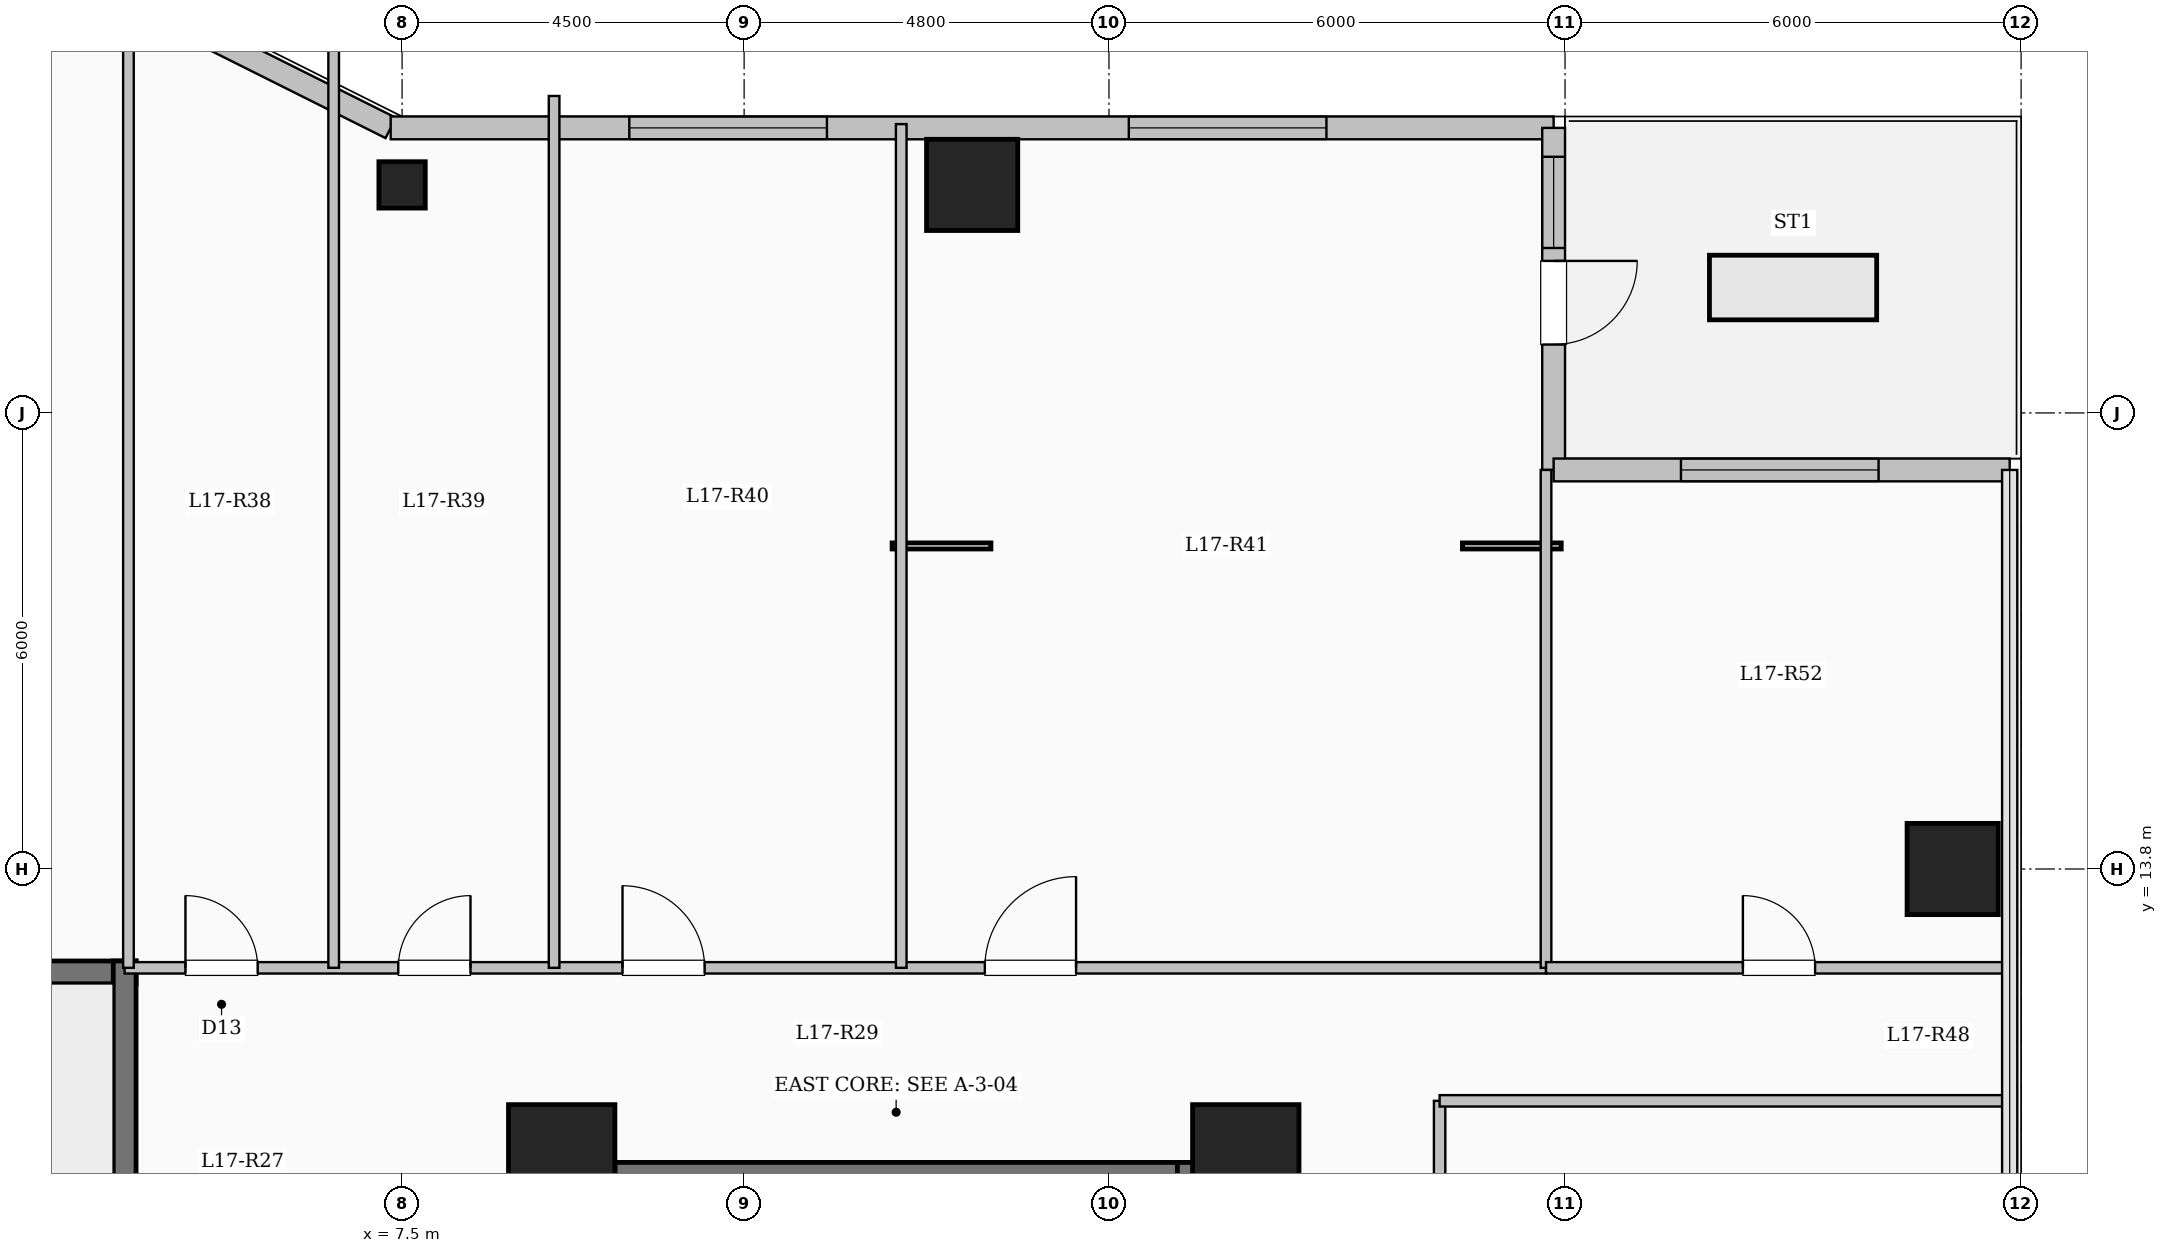
"""IFC4 building model, lengths in metres.
Left out: names, types, materials, properties, quantities, classifications, styles, units other than length and angle.
Written with IfcOpenShell. Run it as: python <this file> out.ifc"""

import sys

from ifc_helpers import new_model, si_unit, direction, frame, frame_2d, origin, origin_2d, place, context, subcontext, project, spatial, rectangle, hollow_circle, extrude, element, fill, save


model = new_model("IFC4")
c1 = context("Model", 3, precision=1e-05, world=origin(), true_north=direction((0.0, 1.0)))
c2 = subcontext(c1, "Body", "Model", "MODEL_VIEW")
j1 = project(units=[si_unit("LENGTHUNIT", "METRE"), si_unit("PLANEANGLEUNIT", "RADIAN")], contexts=[c1])
p1 = place(None, origin())
s1 = spatial("IfcSite", under=j1, at=p1, CompositionType="ELEMENT")
p2 = place(p1, origin())
s2 = spatial("IfcBuilding", under=s1, at=p2, CompositionType="ELEMENT")
p3 = place(p2, frame((0.0, 0.0, 64.2)))
s3 = spatial("IfcBuildingStorey", under=s2, at=p3, CompositionType="ELEMENT", Elevation=64.2)
for number, where, z_axis, x_axis in (
    (1, (9.6, 10.0, 0.0), (0.0, 0.0, 1.0), (1.0, 0.0, 0.0)),
    (2, (18.6, 10.0, 0.0), (0.0, 0.0, 1.0), (1.0, 0.0, 0.0)),
):
    element("IfcColumn", number, at=place(p3, frame(where, z_axis=z_axis, x_axis=x_axis)), inside=s3, PredefinedType="COLUMN", context=c2, shape_type="SweptSolid", body=[
        extrude(rectangle(XDim=1.4, YDim=1.4, at=origin_2d()), origin(), (0.0, 0.0, 1.0), 4.5),
    ])
p4 = place(p3, frame((7.5, 22.8, 0.0), z_axis=(0.0, 0.0, 1.0), x_axis=(1.0, 0.0, 0.0)))
e3 = element("IfcColumn", 3, at=p4, inside=s3, PredefinedType="COLUMN", context=c2, shape_type="SweptSolid", body=[
    extrude(hollow_circle(Radius=0.305, WallThickness=0.025, at=origin_2d()), origin(), (0.0, 0.0, 1.0), 4.5),
])
for number, where, z_axis, x_axis in (
    (4, (15.0, 22.8, 0.0), (0.0, 0.0, 1.0), (1.0, 0.0, 0.0)),
    (5, (27.9, 13.8, 0.0), (0.0, 0.0, 1.0), (1.0, 0.0, 0.0)),
):
    element("IfcColumn", number, at=place(p3, frame(where, z_axis=z_axis, x_axis=x_axis)), inside=s3, PredefinedType="COLUMN", context=c2, shape_type="SweptSolid", body=[
        extrude(rectangle(XDim=1.2, YDim=1.2, at=origin_2d()), origin(), (0.0, 0.0, 1.0), 4.5),
    ])
p5 = place(p3, frame((4.35, 25.05, 0.0), z_axis=(0.0, 0.0, 1.0), x_axis=(0.894427191, -0.4472135955, 0.0)))
e6 = element("IfcWall", 6, at=p5, inside=s3, PredefinedType="SOLIDWALL", context=c2, shape_type="SweptSolid", body=[
    extrude(rectangle(XDim=3.354, YDim=0.3, at=frame_2d((1.677, 0.0))), origin(), (0.0, 0.0, 1.0), 4.2),
])
p6 = place(p3, frame((7.35, 23.55, 0.0), z_axis=(0.0, 0.0, 1.0), x_axis=(1.0, 0.0, 0.0)))
e7 = element("IfcWall", 7, at=p6, inside=s3, PredefinedType="SOLIDWALL", context=c2, shape_type="SweptSolid", body=[
    extrude(rectangle(XDim=15.3, YDim=0.3, at=frame_2d((7.65, 0.0))), origin(), (0.0, 0.0, 1.0), 4.2),
])
p7 = place(p6, frame((3.139, 0.0, 0.85)))
e8 = element("IfcOpeningElement", 8, at=p7, cuts=e7, PredefinedType="OPENING", context=c2, shape_type="SweptSolid", body=[
    extrude(rectangle(XDim=2.6, YDim=2.4, at=frame_2d((1.3, 1.2))), frame((0.0, 0.16, 0.0), z_axis=(0.0, -1.0, 0.0), x_axis=(1.0, 0.0, 0.0)), (0.0, 0.0, 1.0), 0.32),
])
p8 = place(p6, frame((9.711, 0.0, 0.85)))
e9 = element("IfcOpeningElement", 9, at=p8, cuts=e7, PredefinedType="OPENING", context=c2, shape_type="SweptSolid", body=[
    extrude(rectangle(XDim=2.6, YDim=2.4, at=frame_2d((1.3, 1.2))), frame((0.0, 0.16, 0.0), z_axis=(0.0, -1.0, 0.0), x_axis=(1.0, 0.0, 0.0)), (0.0, 0.0, 1.0), 0.32),
])
p9 = place(p3, frame((22.65, 23.55, 0.0), z_axis=(0.0, 0.0, 1.0), x_axis=(0.0, -1.0, 0.0)))
e10 = element("IfcWall", 10, at=p9, inside=s3, PredefinedType="SOLIDWALL", context=c2, shape_type="SweptSolid", body=[
    extrude(rectangle(XDim=4.5, YDim=0.3, at=frame_2d((2.25, 0.0))), origin(), (0.0, 0.0, 1.0), 4.2),
])
p10 = place(p9, frame((1.75, 0.0, 0.0)))
e11 = element("IfcOpeningElement", 11, at=p10, cuts=e10, PredefinedType="OPENING", context=c2, shape_type="SweptSolid", body=[
    extrude(rectangle(XDim=1.1, YDim=2.2, at=frame_2d((0.55, 1.1))), frame((0.0, 0.16, 0.0), z_axis=(0.0, -1.0, 0.0), x_axis=(1.0, 0.0, 0.0)), (0.0, 0.0, 1.0), 0.32),
])
p11 = place(p9, frame((0.38, 0.0, 0.95)))
e12 = element("IfcOpeningElement", 12, at=p11, cuts=e10, PredefinedType="OPENING", context=c2, shape_type="SweptSolid", body=[
    extrude(rectangle(XDim=1.2, YDim=1.5, at=frame_2d((0.6, 0.75))), frame((0.0, 0.16, 0.0), z_axis=(0.0, -1.0, 0.0), x_axis=(1.0, 0.0, 0.0)), (0.0, 0.0, 1.0), 0.32),
])
p12 = place(p3, frame((22.65, 19.05, 0.0), z_axis=(0.0, 0.0, 1.0), x_axis=(1.0, 0.0, 0.0)))
e13 = element("IfcWall", 13, at=p12, inside=s3, PredefinedType="SOLIDWALL", context=c2, shape_type="SweptSolid", body=[
    extrude(rectangle(XDim=6.0, YDim=0.3, at=frame_2d((3.0, 0.0))), origin(), (0.0, 0.0, 1.0), 4.2),
])
p13 = place(p12, frame((1.675, 0.0, 0.85)))
e14 = element("IfcOpeningElement", 14, at=p13, cuts=e13, PredefinedType="OPENING", context=c2, shape_type="SweptSolid", body=[
    extrude(rectangle(XDim=2.6, YDim=2.4, at=frame_2d((1.3, 1.2))), frame((0.0, 0.16, 0.0), z_axis=(0.0, -1.0, 0.0), x_axis=(1.0, 0.0, 0.0)), (0.0, 0.0, 1.0), 0.32),
])
p14 = place(p3, frame((10.0, 9.79, 0.0), z_axis=(0.0, 0.0, 1.0), x_axis=(1.0, 0.0, 0.0)))
e15 = element("IfcWall", 15, at=p14, inside=s3, PredefinedType="SHEAR", context=c2, shape_type="SweptSolid", body=[
    extrude(rectangle(XDim=8.0, YDim=0.3, at=frame_2d((4.0, 0.0))), origin(), (0.0, 0.0, 1.0), 4.5),
])
for number, where, z_axis, x_axis in (
    (16, (10.15, 6.35, 0.0), (0.0, 0.0, 1.0), (0.0, 1.0, 0.0)),
    (17, (17.85, 6.35, 0.0), (0.0, 0.0, 1.0), (0.0, 1.0, 0.0)),
):
    element("IfcWall", number, at=place(p3, frame(where, z_axis=z_axis, x_axis=x_axis)), inside=s3, PredefinedType="SHEAR", context=c2, shape_type="SweptSolid", body=[
        extrude(rectangle(XDim=3.59, YDim=0.3, at=frame_2d((1.795, 0.0))), origin(), (0.0, 0.0, 1.0), 4.5),
    ])
p15 = place(p3, frame((-4.0, 12.44, 0.0), z_axis=(0.0, 0.0, 1.0), x_axis=(1.0, 0.0, 0.0)))
e18 = element("IfcWall", 18, at=p15, inside=s3, PredefinedType="SHEAR", context=c2, shape_type="SweptSolid", body=[
    extrude(rectangle(XDim=8.0, YDim=0.3, at=frame_2d((4.0, 0.0))), origin(), (0.0, 0.0, 1.0), 4.5),
])
p16 = place(p3, frame((3.85, 9.0, 0.0), z_axis=(0.0, 0.0, 1.0), x_axis=(0.0, 1.0, 0.0)))
e19 = element("IfcWall", 19, at=p16, inside=s3, PredefinedType="SHEAR", context=c2, shape_type="SweptSolid", body=[
    extrude(rectangle(XDim=3.59, YDim=0.3, at=frame_2d((1.795, 0.0))), origin(), (0.0, 0.0, 1.0), 4.5),
])
p17 = place(p3, frame((3.85, 12.5, 0.0), z_axis=(0.0, 0.0, 1.0), x_axis=(1.0, 0.0, 0.0)))
e20 = element("IfcWall", 20, at=p17, inside=s3, PredefinedType="PARTITIONING", context=c2, shape_type="SweptSolid", body=[
    extrude(rectangle(XDim=18.7, YDim=0.15, at=frame_2d((9.35, 0.0))), origin(), (0.0, 0.0, 1.0), 4.2),
])
p18 = place(p17, frame((0.8, 0.0, 0.0)))
e21 = element("IfcOpeningElement", 21, at=p18, cuts=e20, PredefinedType="OPENING", context=c2, shape_type="SweptSolid", body=[
    extrude(rectangle(XDim=0.95, YDim=2.15, at=frame_2d((0.475, 1.075))), frame((0.0, 0.085, 0.0), z_axis=(0.0, -1.0, 0.0), x_axis=(1.0, 0.0, 0.0)), (0.0, 0.0, 1.0), 0.17),
])
p19 = place(p17, frame((3.6, 0.0, 0.0)))
e22 = element("IfcOpeningElement", 22, at=p19, cuts=e20, PredefinedType="OPENING", context=c2, shape_type="SweptSolid", body=[
    extrude(rectangle(XDim=0.95, YDim=2.15, at=frame_2d((0.475, 1.075))), frame((0.0, 0.085, 0.0), z_axis=(0.0, -1.0, 0.0), x_axis=(1.0, 0.0, 0.0)), (0.0, 0.0, 1.0), 0.17),
])
p20 = place(p17, frame((6.55, 0.0, 0.0)))
e23 = element("IfcOpeningElement", 23, at=p20, cuts=e20, PredefinedType="OPENING", context=c2, shape_type="SweptSolid", body=[
    extrude(rectangle(XDim=1.08, YDim=2.15, at=frame_2d((0.54, 1.075))), frame((0.0, 0.085, 0.0), z_axis=(0.0, -1.0, 0.0), x_axis=(1.0, 0.0, 0.0)), (0.0, 0.0, 1.0), 0.17),
])
p21 = place(p17, frame((11.317, 0.0, 0.0)))
e24 = element("IfcOpeningElement", 24, at=p21, cuts=e20, PredefinedType="OPENING", context=c2, shape_type="SweptSolid", body=[
    extrude(rectangle(XDim=1.2, YDim=2.15, at=frame_2d((0.6, 1.075))), frame((0.0, 0.085, 0.0), z_axis=(0.0, -1.0, 0.0), x_axis=(1.0, 0.0, 0.0)), (0.0, 0.0, 1.0), 0.17),
])
p22 = place(p3, frame((21.15, -7.25, 0.0), z_axis=(0.0, 0.0, 1.0), x_axis=(0.0, 1.0, 0.0)))
e25 = element("IfcWall", 25, at=p22, inside=s3, PredefinedType="PARTITIONING", context=c2, shape_type="SweptSolid", body=[
    extrude(rectangle(XDim=18.0, YDim=0.15, at=frame_2d((9.0, 0.0))), origin(), (0.0, 0.0, 1.0), 3.635),
])
p23 = place(p3, frame((3.9, 12.5, 0.0), z_axis=(0.0, 0.0, 1.0), x_axis=(0.0, 1.0, 0.0)))
e26 = element("IfcWall", 26, at=p23, inside=s3, PredefinedType="PARTITIONING", context=c2, shape_type="SweptSolid", body=[
    extrude(rectangle(XDim=12.58, YDim=0.14, at=frame_2d((6.29, 0.0))), origin(), (0.0, 0.0, 1.0), 4.2),
])
p24 = place(p3, frame((6.6, 12.5, 0.0), z_axis=(0.0, 0.0, 1.0), x_axis=(0.0, 1.0, 0.0)))
e27 = element("IfcWall", 27, at=p24, inside=s3, PredefinedType="PARTITIONING", context=c2, shape_type="SweptSolid", body=[
    extrude(rectangle(XDim=12.185, YDim=0.14, at=frame_2d((6.093, 0.0))), origin(), (0.0, 0.0, 1.0), 4.2),
])
p25 = place(p3, frame((9.5, 12.5, 0.0), z_axis=(0.0, 0.0, 1.0), x_axis=(0.0, 1.0, 0.0)))
e28 = element("IfcWall", 28, at=p25, inside=s3, PredefinedType="PARTITIONING", context=c2, shape_type="SweptSolid", body=[
    extrude(rectangle(XDim=11.47, YDim=0.14, at=frame_2d((5.735, 0.0))), origin(), (0.0, 0.0, 1.0), 4.2),
])
p26 = place(p3, frame((14.067, 12.5, 0.0), z_axis=(0.0, 0.0, 1.0), x_axis=(0.0, 1.0, 0.0)))
e29 = element("IfcWall", 29, at=p26, inside=s3, PredefinedType="PARTITIONING", context=c2, shape_type="SweptSolid", body=[
    extrude(rectangle(XDim=11.1, YDim=0.14, at=frame_2d((5.55, 0.0))), origin(), (0.0, 0.0, 1.0), 4.2),
])
p27 = place(p3, frame((21.15, 10.75, 0.0), z_axis=(0.0, 0.0, 1.0), x_axis=(1.0, 0.0, 0.0)))
e30 = element("IfcWall", 30, at=p27, inside=s3, PredefinedType="PARTITIONING", context=c2, shape_type="SweptSolid", body=[
    extrude(rectangle(XDim=7.53, YDim=0.15, at=frame_2d((3.765, 0.0))), origin(), (0.0, 0.0, 1.0), 4.2),
])
p28 = place(p3, frame((22.55, 12.5, 0.0), z_axis=(0.0, 0.0, 1.0), x_axis=(0.0, 1.0, 0.0)))
e31 = element("IfcWall", 31, at=p28, inside=s3, PredefinedType="PARTITIONING", context=c2, shape_type="SweptSolid", body=[
    extrude(rectangle(XDim=6.55, YDim=0.14, at=frame_2d((3.275, 0.0))), origin(), (0.0, 0.0, 1.0), 4.2),
])
p29 = place(p3, frame((22.55, 12.5, 0.0), z_axis=(0.0, 0.0, 1.0), x_axis=(1.0, 0.0, 0.0)))
e32 = element("IfcWall", 32, at=p29, inside=s3, PredefinedType="PARTITIONING", context=c2, shape_type="SweptSolid", body=[
    extrude(rectangle(XDim=6.13, YDim=0.15, at=frame_2d((3.065, 0.0))), origin(), (0.0, 0.0, 1.0), 4.2),
])
p30 = place(p29, frame((2.59, 0.0, 0.0)))
e33 = element("IfcOpeningElement", 33, at=p30, cuts=e32, PredefinedType="OPENING", context=c2, shape_type="SweptSolid", body=[
    extrude(rectangle(XDim=0.95, YDim=2.15, at=frame_2d((0.475, 1.075))), frame((0.0, 0.085, 0.0), z_axis=(0.0, -1.0, 0.0), x_axis=(1.0, 0.0, 0.0)), (0.0, 0.0, 1.0), 0.17),
])
p31 = place(p7, origin())
e34 = element("IfcWindow", 34, at=p31, inside=s3, PartitioningType="SINGLE_PANEL", PredefinedType="WINDOW", context=c2, shape_type="SweptSolid", body=[
    extrude(rectangle(XDim=2.6, YDim=2.4, at=frame_2d((1.3, 1.2))), frame((0.0, 0.03, 0.0), z_axis=(0.0, -1.0, 0.0), x_axis=(1.0, 0.0, 0.0)), (0.0, 0.0, 1.0), 0.06),
])
fill(e8, e34)
p32 = place(p8, origin())
e35 = element("IfcWindow", 35, at=p32, inside=s3, PartitioningType="SINGLE_PANEL", PredefinedType="WINDOW", context=c2, shape_type="SweptSolid", body=[
    extrude(rectangle(XDim=2.6, YDim=2.4, at=frame_2d((1.3, 1.2))), frame((0.0, 0.03, 0.0), z_axis=(0.0, -1.0, 0.0), x_axis=(1.0, 0.0, 0.0)), (0.0, 0.0, 1.0), 0.06),
])
fill(e9, e35)
p33 = place(p10, origin())
e36 = element("IfcDoor", 36, at=p33, inside=s3, OperationType="SINGLE_SWING_LEFT", PredefinedType="DOOR", context=c2, shape_type="SweptSolid", body=[
    extrude(rectangle(XDim=1.1, YDim=2.2, at=frame_2d((0.55, 1.1))), frame((0.0, 0.025, 0.0), z_axis=(0.0, -1.0, 0.0), x_axis=(1.0, 0.0, 0.0)), (0.0, 0.0, 1.0), 0.05),
])
fill(e11, e36)
p34 = place(p11, origin())
e37 = element("IfcWindow", 37, at=p34, inside=s3, PartitioningType="SINGLE_PANEL", PredefinedType="WINDOW", context=c2, shape_type="SweptSolid", body=[
    extrude(rectangle(XDim=1.2, YDim=1.5, at=frame_2d((0.6, 0.75))), frame((0.0, 0.03, 0.0), z_axis=(0.0, -1.0, 0.0), x_axis=(1.0, 0.0, 0.0)), (0.0, 0.0, 1.0), 0.06),
])
fill(e12, e37)
p35 = place(p13, origin())
e38 = element("IfcWindow", 38, at=p35, inside=s3, PartitioningType="SINGLE_PANEL", PredefinedType="WINDOW", context=c2, shape_type="SweptSolid", body=[
    extrude(rectangle(XDim=2.6, YDim=2.4, at=frame_2d((1.3, 1.2))), frame((0.0, 0.03, 0.0), z_axis=(0.0, -1.0, 0.0), x_axis=(1.0, 0.0, 0.0)), (0.0, 0.0, 1.0), 0.06),
])
fill(e14, e38)
p36 = place(p18, origin())
e39 = element("IfcDoor", 39, at=p36, inside=s3, OperationType="SINGLE_SWING_LEFT", PredefinedType="DOOR", context=c2, shape_type="SweptSolid", body=[
    extrude(rectangle(XDim=0.95, YDim=2.15, at=frame_2d((0.475, 1.075))), frame((0.0, 0.025, 0.0), z_axis=(0.0, -1.0, 0.0), x_axis=(1.0, 0.0, 0.0)), (0.0, 0.0, 1.0), 0.05),
])
fill(e21, e39)
p37 = place(p19, origin())
e40 = element("IfcDoor", 40, at=p37, inside=s3, OperationType="SINGLE_SWING_RIGHT", PredefinedType="DOOR", context=c2, shape_type="SweptSolid", body=[
    extrude(rectangle(XDim=0.95, YDim=2.15, at=frame_2d((0.475, 1.075))), frame((0.0, 0.025, 0.0), z_axis=(0.0, -1.0, 0.0), x_axis=(1.0, 0.0, 0.0)), (0.0, 0.0, 1.0), 0.05),
])
fill(e22, e40)
p38 = place(p20, origin())
e41 = element("IfcDoor", 41, at=p38, inside=s3, OperationType="SINGLE_SWING_LEFT", PredefinedType="DOOR", context=c2, shape_type="SweptSolid", body=[
    extrude(rectangle(XDim=1.08, YDim=2.15, at=frame_2d((0.54, 1.075))), frame((0.0, 0.025, 0.0), z_axis=(0.0, -1.0, 0.0), x_axis=(1.0, 0.0, 0.0)), (0.0, 0.0, 1.0), 0.05),
])
fill(e23, e41)
p39 = place(p21, origin())
e42 = element("IfcDoor", 42, at=p39, inside=s3, OperationType="SINGLE_SWING_RIGHT", PredefinedType="DOOR", context=c2, shape_type="SweptSolid", body=[
    extrude(rectangle(XDim=1.2, YDim=2.15, at=frame_2d((0.6, 1.075))), frame((0.0, 0.025, 0.0), z_axis=(0.0, -1.0, 0.0), x_axis=(1.0, 0.0, 0.0)), (0.0, 0.0, 1.0), 0.05),
])
fill(e24, e42)
p40 = place(p30, origin())
e43 = element("IfcDoor", 43, at=p40, inside=s3, OperationType="SINGLE_SWING_LEFT", PredefinedType="DOOR", context=c2, shape_type="SweptSolid", body=[
    extrude(rectangle(XDim=0.95, YDim=2.15, at=frame_2d((0.475, 1.075))), frame((0.0, 0.025, 0.0), z_axis=(0.0, -1.0, 0.0), x_axis=(1.0, 0.0, 0.0)), (0.0, 0.0, 1.0), 0.05),
])
fill(e33, e43)
save(model, sys.argv[1])
